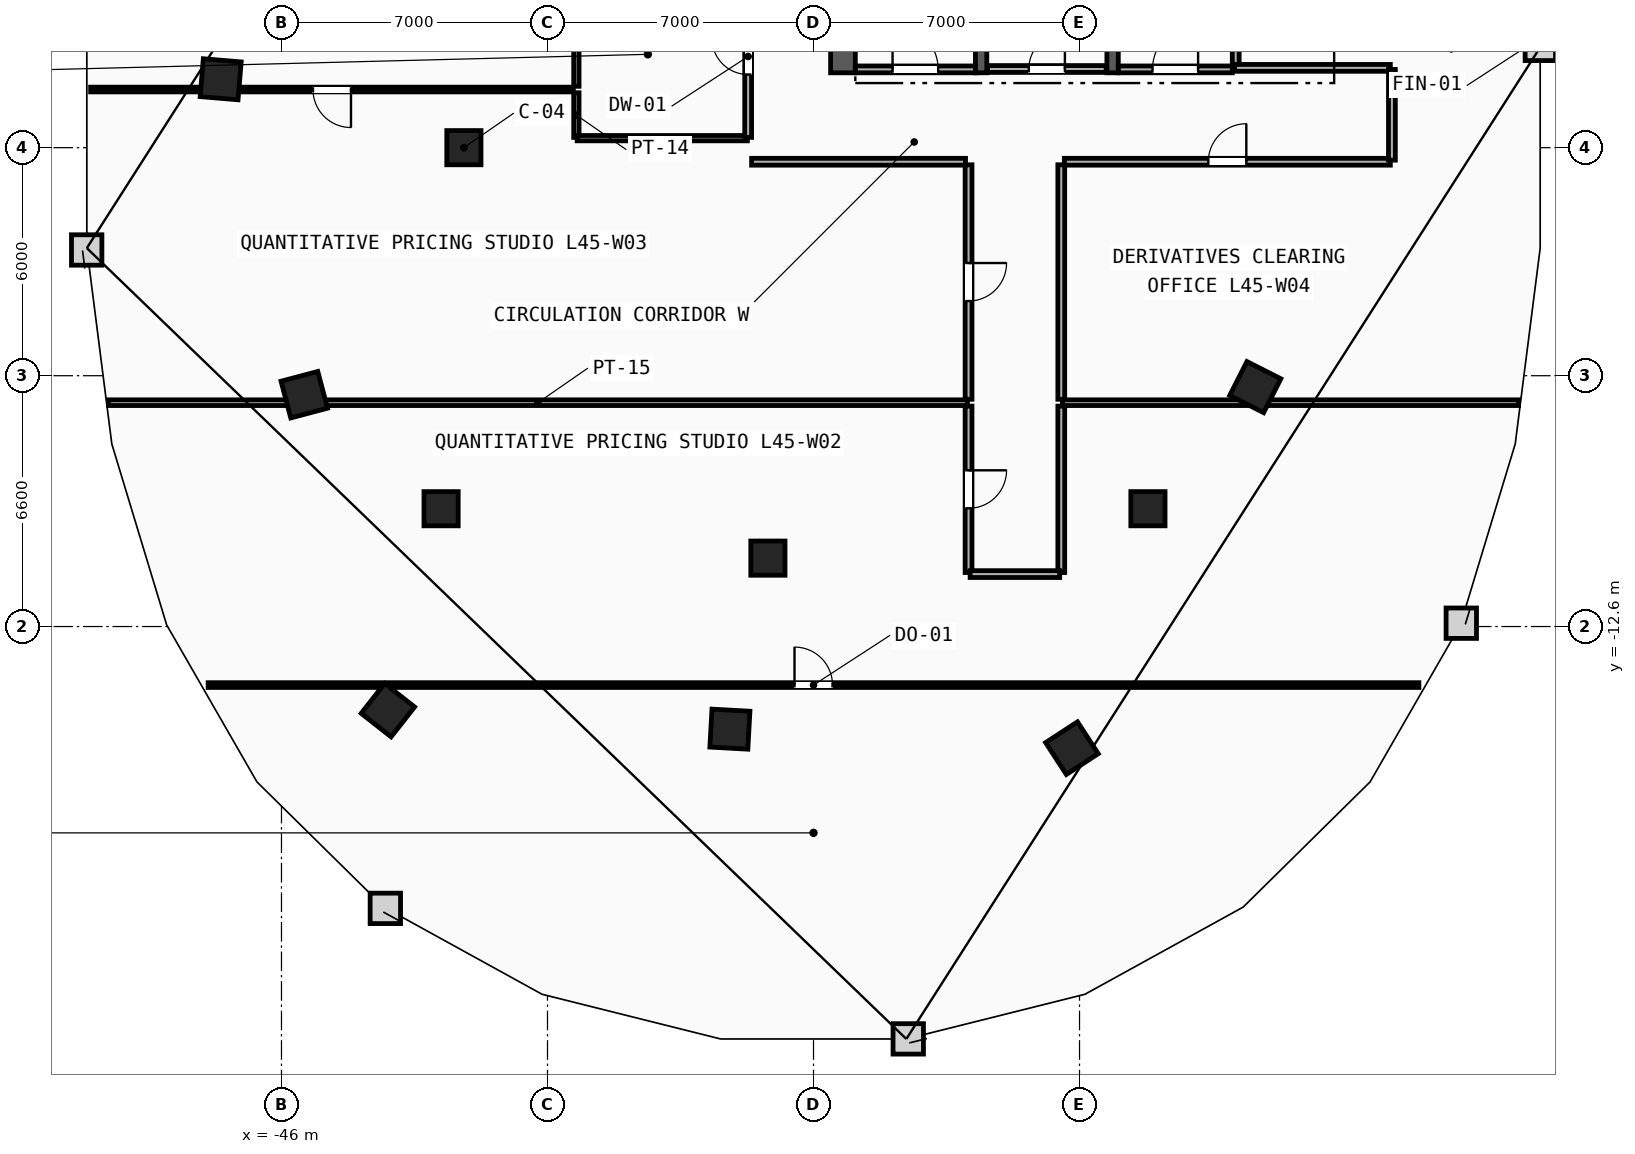
"""IFC4 building model, lengths in metres.
Left out: names, types, materials, properties, quantities, classifications, styles, units other than length and angle.
Written with IfcOpenShell. Run it as: python <this file> out.ifc"""

import sys

from ifc_helpers import new_model, si_unit, direction, frame, frame_2d, origin, origin_2d, place, context, subcontext, project, spatial, rectangle, extrude, element, fill, save


model = new_model("IFC4")
c1 = context("Model", 3, precision=1e-05, world=origin(), true_north=direction((0.0, 1.0)))
c2 = subcontext(c1, "Body", "Model", "MODEL_VIEW")
j1 = project(units=[si_unit("LENGTHUNIT", "METRE"), si_unit("PLANEANGLEUNIT", "RADIAN")], contexts=[c1])
p1 = place(None, origin())
s1 = spatial("IfcSite", under=j1, at=p1, CompositionType="ELEMENT")
p2 = place(p1, origin())
s2 = spatial("IfcBuilding", under=s1, at=p2, CompositionType="ELEMENT")
p3 = place(p2, frame((0.0, 0.0, 172.8)))
s3 = spatial("IfcBuildingStorey", under=s2, at=p3, CompositionType="ELEMENT", Elevation=172.8)
for number, where, z_axis, x_axis in (
    (1, (-41.2, 0.0, 0.0), (0.0, 0.0, 1.0), (1.0, 0.0, 0.0)),
    (2, (-41.8, -9.5, 0.0), (0.0, 0.0, 1.0), (1.0, 0.0, 0.0)),
    (3, (-33.2, -10.8, 0.0), (0.0, 0.0, 1.0), (1.0, 0.0, 0.0)),
    (4, (-23.2, -9.5, 0.0), (0.0, 0.0, 1.0), (1.0, 0.0, 0.0)),
):
    element("IfcColumn", number, at=place(p3, frame(where, z_axis=z_axis, x_axis=x_axis)), inside=s3, PredefinedType="COLUMN", context=c2, shape_type="SweptSolid", body=[
        extrude(rectangle(XDim=0.9, YDim=0.9, at=origin_2d()), origin(), (0.0, 0.0, 1.0), 3.6),
    ])
for number, where, z_axis, x_axis in (
    (5, (-47.6, 1.8, 0.0), (0.0, 0.0, 1.0), (-0.084, -0.997, 0.0)),
    (6, (-45.4, -6.5, 0.0), (0.0, 0.0, 1.0), (0.256, -0.967, 0.0)),
    (7, (-43.2, -14.8, 0.0), (0.0, 0.0, 1.0), (0.786, -0.618, 0.0)),
    (8, (-34.2, -15.3, 0.0), (0.0, 0.0, 1.0), (0.998, -0.055, 0.0)),
    (9, (-25.2, -15.8, 0.0), (0.0, 0.0, 1.0), (0.838, 0.546, 0.0)),
    (10, (-20.375, -6.3, 0.0), (0.0, 0.0, 1.0), (0.453, 0.892, 0.0)),
):
    element("IfcColumn", number, at=place(p3, frame(where, z_axis=z_axis, x_axis=x_axis)), inside=s3, PredefinedType="COLUMN", context=c2, shape_type="SweptSolid", body=[
        extrude(rectangle(XDim=1.0, YDim=1.0, at=origin_2d()), origin(), (0.0, 0.0, 1.0), 3.6),
    ])
p4 = place(p3, frame((-31.225, 1.97, 0.0), z_axis=(0.0, 0.0, 1.0), x_axis=(0.0, 1.0, 0.0)))
e11 = element("IfcWall", 11, at=p4, inside=s3, PredefinedType="SHEAR", context=c2, shape_type="SweptSolid", body=[
    extrude(rectangle(XDim=13.33, YDim=0.65, at=frame_2d((6.665, 0.0))), origin(), (0.0, 0.0, 1.0), 3.36),
])
for number, where, z_axis, x_axis in (
    (12, (-27.59, 1.97, 0.0), (0.0, 0.0, 1.0), (0.0, 1.0, 0.0)),
    (13, (-24.13, 1.97, 0.0), (0.0, 0.0, 1.0), (0.0, 1.0, 0.0)),
):
    element("IfcWall", number, at=place(p3, frame(where, z_axis=z_axis, x_axis=x_axis)), inside=s3, PredefinedType="SHEAR", context=c2, shape_type="SweptSolid", body=[
        extrude(rectangle(XDim=10.68, YDim=0.3, at=frame_2d((5.34, 0.0))), origin(), (0.0, 0.0, 1.0), 3.36),
    ])
p5 = place(p3, frame((-20.89, 2.15, 0.0), z_axis=(0.0, 0.0, 1.0), x_axis=(0.0, 1.0, 0.0)))
e14 = element("IfcWall", 14, at=p5, inside=s3, PredefinedType="PARTITIONING", context=c2, shape_type="SweptSolid", body=[
    extrude(rectangle(XDim=5.3, YDim=0.18, at=frame_2d((2.65, 0.0))), origin(), (0.0, 0.0, 1.0), 3.36),
])
p6 = place(p3, frame((-23.98, 2.06, 0.0), z_axis=(0.0, 0.0, 1.0), x_axis=(1.0, 0.0, 0.0)))
e15 = element("IfcWall", 15, at=p6, inside=s3, PredefinedType="PARTITIONING", context=c2, shape_type="SweptSolid", body=[
    extrude(rectangle(XDim=3.0, YDim=0.18, at=frame_2d((1.5, 0.0))), origin(), (0.0, 0.0, 1.0), 3.36),
])
p7 = place(p6, frame((0.9, 0.0, 0.0)))
e16 = element("IfcOpeningElement", 16, at=p7, cuts=e15, PredefinedType="OPENING", context=c2, shape_type="SweptSolid", body=[
    extrude(rectangle(XDim=1.2, YDim=2.15, at=frame_2d((0.6, 1.075))), frame((0.0, 0.1, 0.0), z_axis=(0.0, -1.0, 0.0), x_axis=(1.0, 0.0, 0.0)), (0.0, 0.0, 1.0), 0.2),
])
p8 = place(p3, frame((-30.9, 2.06, 0.0), z_axis=(0.0, 0.0, 1.0), x_axis=(1.0, 0.0, 0.0)))
e17 = element("IfcWall", 17, at=p8, inside=s3, PredefinedType="PARTITIONING", context=c2, shape_type="SweptSolid", body=[
    extrude(rectangle(XDim=3.16, YDim=0.18, at=frame_2d((1.58, 0.0))), origin(), (0.0, 0.0, 1.0), 3.36),
])
p9 = place(p8, frame((0.98, 0.0, 0.0)))
e18 = element("IfcOpeningElement", 18, at=p9, cuts=e17, PredefinedType="OPENING", context=c2, shape_type="SweptSolid", body=[
    extrude(rectangle(XDim=1.2, YDim=2.15, at=frame_2d((0.6, 1.075))), frame((0.0, 0.1, 0.0), z_axis=(0.0, -1.0, 0.0), x_axis=(1.0, 0.0, 0.0)), (0.0, 0.0, 1.0), 0.2),
])
p10 = place(p3, frame((-27.42, 2.07, 0.0), z_axis=(0.0, 0.0, 1.0), x_axis=(1.0, 0.0, 0.0)))
e19 = element("IfcWall", 19, at=p10, inside=s3, PredefinedType="PARTITIONING", context=c2, shape_type="SweptSolid", body=[
    extrude(rectangle(XDim=3.12, YDim=0.18, at=frame_2d((1.56, 0.0))), origin(), (0.0, 0.0, 1.0), 3.36),
])
p11 = place(p10, frame((1.085, 0.0, 0.0)))
e20 = element("IfcOpeningElement", 20, at=p11, cuts=e19, PredefinedType="OPENING", context=c2, shape_type="SweptSolid", body=[
    extrude(rectangle(XDim=0.95, YDim=2.1, at=frame_2d((0.475, 1.05))), frame((0.0, 0.1, 0.0), z_axis=(0.0, -1.0, 0.0), x_axis=(1.0, 0.0, 0.0)), (0.0, 0.0, 1.0), 0.2),
])
p12 = place(p3, frame((-38.24, 0.27, 0.0), z_axis=(0.0, 0.0, 1.0), x_axis=(0.0, 1.0, 0.0)))
e21 = element("IfcWall", 21, at=p12, inside=s3, PredefinedType="PARTITIONING", context=c2, shape_type="SweptSolid", body=[
    extrude(rectangle(XDim=1.175, YDim=0.14, at=frame_2d((0.587, 0.0))), origin(), (0.0, 0.0, 1.0), 3.36),
])
p13 = place(p3, frame((-38.24, 1.615, 0.0), z_axis=(0.0, 0.0, 1.0), x_axis=(0.0, 1.0, 0.0)))
e22 = element("IfcWall", 22, at=p13, inside=s3, PredefinedType="PARTITIONING", context=c2, shape_type="SweptSolid", body=[
    extrude(rectangle(XDim=2.93, YDim=0.14, at=frame_2d((1.465, 0.0))), origin(), (0.0, 0.0, 1.0), 3.36),
])
p14 = place(p3, frame((-38.22, 0.25, 0.0), z_axis=(0.0, 0.0, 1.0), x_axis=(1.0, 0.0, 0.0)))
e23 = element("IfcWall", 23, at=p14, inside=s3, PredefinedType="PARTITIONING", context=c2, shape_type="SweptSolid", body=[
    extrude(rectangle(XDim=4.48, YDim=0.14, at=frame_2d((2.24, 0.0))), origin(), (0.0, 0.0, 1.0), 3.36),
])
p15 = place(p3, frame((-33.72, 0.27, 0.0), z_axis=(0.0, 0.0, 1.0), x_axis=(0.0, 1.0, 0.0)))
e24 = element("IfcWall", 24, at=p15, inside=s3, PredefinedType="PARTITIONING", context=c2, shape_type="SweptSolid", body=[
    extrude(rectangle(XDim=4.26, YDim=0.18, at=frame_2d((2.13, 0.0))), origin(), (0.0, 0.0, 1.0), 3.36),
])
p16 = place(p15, frame((1.655, 0.0, 0.0)))
e25 = element("IfcOpeningElement", 25, at=p16, cuts=e24, PredefinedType="OPENING", context=c2, shape_type="SweptSolid", body=[
    extrude(rectangle(XDim=0.95, YDim=2.1, at=frame_2d((0.475, 1.05))), frame((0.0, 0.1, 0.0), z_axis=(0.0, -1.0, 0.0), x_axis=(1.0, 0.0, 0.0)), (0.0, 0.0, 1.0), 0.2),
])
p17 = place(p3, frame((-50.553, -6.71, 0.0), z_axis=(0.0, 0.0, 1.0), x_axis=(1.0, 0.0, 0.0)))
e26 = element("IfcWall", 26, at=p17, inside=s3, PredefinedType="PARTITIONING", context=c2, shape_type="SweptSolid", body=[
    extrude(rectangle(XDim=22.603, YDim=0.15, at=frame_2d((11.302, 0.0))), origin(), (0.0, 0.0, 1.0), 3.36),
])
p18 = place(p3, frame((-25.45, -6.71, 0.0), z_axis=(0.0, 0.0, 1.0), x_axis=(1.0, 0.0, 0.0)))
e27 = element("IfcWall", 27, at=p18, inside=s3, PredefinedType="PARTITIONING", context=c2, shape_type="SweptSolid", body=[
    extrude(rectangle(XDim=12.003, YDim=0.15, at=frame_2d((6.001, 0.0))), origin(), (0.0, 0.0, 1.0), 3.36),
])
p19 = place(p3, frame((-27.92, -6.8, 0.0), z_axis=(0.0, 0.0, 1.0), x_axis=(0.0, -1.0, 0.0)))
e28 = element("IfcWall", 28, at=p19, inside=s3, PredefinedType="PARTITIONING", context=c2, shape_type="SweptSolid", body=[
    extrude(rectangle(XDim=4.378, YDim=0.18, at=frame_2d((2.189, 0.0))), origin(), (0.0, 0.0, 1.0), 3.36),
])
p20 = place(p19, frame((1.689, 0.0, 0.0)))
e29 = element("IfcOpeningElement", 29, at=p20, cuts=e28, PredefinedType="OPENING", context=c2, shape_type="SweptSolid", body=[
    extrude(rectangle(XDim=1.0, YDim=2.15, at=frame_2d((0.5, 1.075))), frame((0.0, 0.1, 0.0), z_axis=(0.0, -1.0, 0.0), x_axis=(1.0, 0.0, 0.0)), (0.0, 0.0, 1.0), 0.2),
])
p21 = place(p3, frame((-25.48, -11.178, 0.0), z_axis=(0.0, 0.0, 1.0), x_axis=(0.0, 1.0, 0.0)))
e30 = element("IfcWall", 30, at=p21, inside=s3, PredefinedType="PARTITIONING", context=c2, shape_type="SweptSolid", body=[
    extrude(rectangle(XDim=4.378, YDim=0.18, at=frame_2d((2.189, 0.0))), origin(), (0.0, 0.0, 1.0), 3.36),
])
p22 = place(p3, frame((-27.878, -11.22, 0.0), z_axis=(0.0, 0.0, 1.0), x_axis=(1.0, 0.0, 0.0)))
e31 = element("IfcWall", 31, at=p22, inside=s3, PredefinedType="PARTITIONING", context=c2, shape_type="SweptSolid", body=[
    extrude(rectangle(XDim=2.357, YDim=0.18, at=frame_2d((1.178, 0.0))), origin(), (0.0, 0.0, 1.0), 3.36),
])
p23 = place(p3, frame((-27.92, -0.45, 0.0), z_axis=(0.0, 0.0, 1.0), x_axis=(0.0, -1.0, 0.0)))
e32 = element("IfcWall", 32, at=p23, inside=s3, PredefinedType="PARTITIONING", context=c2, shape_type="SweptSolid", body=[
    extrude(rectangle(XDim=6.17, YDim=0.18, at=frame_2d((3.085, 0.0))), origin(), (0.0, 0.0, 1.0), 3.36),
])
p24 = place(p23, frame((2.585, 0.0, 0.0)))
e33 = element("IfcOpeningElement", 33, at=p24, cuts=e32, PredefinedType="OPENING", context=c2, shape_type="SweptSolid", body=[
    extrude(rectangle(XDim=1.0, YDim=2.15, at=frame_2d((0.5, 1.075))), frame((0.0, 0.1, 0.0), z_axis=(0.0, -1.0, 0.0), x_axis=(1.0, 0.0, 0.0)), (0.0, 0.0, 1.0), 0.2),
])
p25 = place(p3, frame((-33.628, -0.37, 0.0), z_axis=(0.0, 0.0, 1.0), x_axis=(1.0, 0.0, 0.0)))
e34 = element("IfcWall", 34, at=p25, inside=s3, PredefinedType="PARTITIONING", context=c2, shape_type="SweptSolid", body=[
    extrude(rectangle(XDim=5.628, YDim=0.18, at=frame_2d((2.814, 0.0))), origin(), (0.0, 0.0, 1.0), 3.36),
])
p26 = place(p3, frame((-25.4, -0.37, 0.0), z_axis=(0.0, 0.0, 1.0), x_axis=(1.0, 0.0, 0.0)))
e35 = element("IfcWall", 35, at=p26, inside=s3, PredefinedType="PARTITIONING", context=c2, shape_type="SweptSolid", body=[
    extrude(rectangle(XDim=8.578, YDim=0.18, at=frame_2d((4.289, 0.0))), origin(), (0.0, 0.0, 1.0), 3.36),
])
p27 = place(p26, frame((3.789, 0.0, 0.0)))
e36 = element("IfcOpeningElement", 36, at=p27, cuts=e35, PredefinedType="OPENING", context=c2, shape_type="SweptSolid", body=[
    extrude(rectangle(XDim=1.0, YDim=2.15, at=frame_2d((0.5, 1.075))), frame((0.0, 0.1, 0.0), z_axis=(0.0, -1.0, 0.0), x_axis=(1.0, 0.0, 0.0)), (0.0, 0.0, 1.0), 0.2),
])
p28 = place(p3, frame((-25.48, -6.62, 0.0), z_axis=(0.0, 0.0, 1.0), x_axis=(0.0, 1.0, 0.0)))
e37 = element("IfcWall", 37, at=p28, inside=s3, PredefinedType="PARTITIONING", context=c2, shape_type="SweptSolid", body=[
    extrude(rectangle(XDim=6.17, YDim=0.18, at=frame_2d((3.085, 0.0))), origin(), (0.0, 0.0, 1.0), 3.36),
])
p29 = place(p3, frame((-16.822, 2.1, 0.0), z_axis=(0.0, 0.0, 1.0), x_axis=(-1.0, 0.0, 0.0)))
e38 = element("IfcWall", 38, at=p29, inside=s3, PredefinedType="PARTITIONING", context=c2, shape_type="SweptSolid", body=[
    extrude(rectangle(XDim=4.098, YDim=0.18, at=frame_2d((2.049, 0.0))), origin(), (0.0, 0.0, 1.0), 3.36),
])
p30 = place(p3, frame((-16.78, -0.329, 0.0), z_axis=(0.0, 0.0, 1.0), x_axis=(0.0, 1.0, 0.0)))
e39 = element("IfcWall", 39, at=p30, inside=s3, PredefinedType="PARTITIONING", context=c2, shape_type="SweptSolid", body=[
    extrude(rectangle(XDim=2.387, YDim=0.18, at=frame_2d((1.194, 0.0))), origin(), (0.0, 0.0, 1.0), 3.36),
])
p31 = place(p3, frame((-47.93, -14.14, 0.0), z_axis=(0.0, 0.0, 1.0), x_axis=(1.0, 0.0, 0.0)))
e40 = element("IfcWall", 40, at=p31, inside=s3, PredefinedType="PARTITIONING", context=c2, shape_type="SweptSolid", body=[
    extrude(rectangle(XDim=31.86, YDim=0.125, at=frame_2d((15.93, 0.0))), origin(), (0.0, 0.0, 1.0), 3.36),
])
p32 = place(p31, frame((15.43, 0.0, 0.0)))
e41 = element("IfcOpeningElement", 41, at=p32, cuts=e40, PredefinedType="OPENING", context=c2, shape_type="SweptSolid", body=[
    extrude(rectangle(XDim=1.0, YDim=2.15, at=frame_2d((0.5, 1.075))), frame((0.0, 0.073, 0.0), z_axis=(0.0, -1.0, 0.0), x_axis=(1.0, 0.0, 0.0)), (0.0, 0.0, 1.0), 0.145),
])
p33 = place(p3, frame((-38.32, 1.53, 0.0), z_axis=(0.0, 0.0, 1.0), x_axis=(-1.0, 0.0, 0.0)))
e42 = element("IfcWall", 42, at=p33, inside=s3, PredefinedType="PARTITIONING", context=c2, shape_type="SweptSolid", body=[
    extrude(rectangle(XDim=12.702, YDim=0.125, at=frame_2d((6.351, 0.0))), origin(), (0.0, 0.0, 1.0), 3.36),
])
p34 = place(p33, frame((5.851, 0.0, 0.0)))
e43 = element("IfcOpeningElement", 43, at=p34, cuts=e42, PredefinedType="OPENING", context=c2, shape_type="SweptSolid", body=[
    extrude(rectangle(XDim=1.0, YDim=2.15, at=frame_2d((0.5, 1.075))), frame((0.0, 0.073, 0.0), z_axis=(0.0, -1.0, 0.0), x_axis=(1.0, 0.0, 0.0)), (0.0, 0.0, 1.0), 0.145),
])
p35 = place(p7, origin())
e44 = element("IfcDoor", 44, at=p35, inside=s3, OperationType="SINGLE_SWING_RIGHT", PredefinedType="DOOR", context=c2, shape_type="SweptSolid", body=[
    extrude(rectangle(XDim=1.2, YDim=2.15, at=frame_2d((0.6, 1.075))), frame((0.0, 0.025, 0.0), z_axis=(0.0, -1.0, 0.0), x_axis=(1.0, 0.0, 0.0)), (0.0, 0.0, 1.0), 0.05),
])
fill(e16, e44)
p36 = place(p9, origin())
e45 = element("IfcDoor", 45, at=p36, inside=s3, OperationType="SINGLE_SWING_LEFT", PredefinedType="DOOR", context=c2, shape_type="SweptSolid", body=[
    extrude(rectangle(XDim=1.2, YDim=2.15, at=frame_2d((0.6, 1.075))), frame((0.0, 0.025, 0.0), z_axis=(0.0, -1.0, 0.0), x_axis=(1.0, 0.0, 0.0)), (0.0, 0.0, 1.0), 0.05),
])
fill(e18, e45)
p37 = place(p32, origin())
e46 = element("IfcDoor", 46, at=p37, inside=s3, OperationType="SINGLE_SWING_LEFT", PredefinedType="DOOR", context=c2, shape_type="SweptSolid", body=[
    extrude(rectangle(XDim=1.0, YDim=2.15, at=frame_2d((0.5, 1.075))), frame((0.0, 0.025, 0.0), z_axis=(0.0, -1.0, 0.0), x_axis=(1.0, 0.0, 0.0)), (0.0, 0.0, 1.0), 0.05),
])
fill(e41, e46)
p38 = place(p34, origin())
e47 = element("IfcDoor", 47, at=p38, inside=s3, OperationType="SINGLE_SWING_LEFT", PredefinedType="DOOR", context=c2, shape_type="SweptSolid", body=[
    extrude(rectangle(XDim=1.0, YDim=2.15, at=frame_2d((0.5, 1.075))), frame((0.0, 0.025, 0.0), z_axis=(0.0, -1.0, 0.0), x_axis=(1.0, 0.0, 0.0)), (0.0, 0.0, 1.0), 0.05),
])
fill(e43, e47)
p39 = place(p27, origin())
e48 = element("IfcDoor", 48, at=p39, inside=s3, OperationType="SINGLE_SWING_RIGHT", PredefinedType="DOOR", context=c2, shape_type="SweptSolid", body=[
    extrude(rectangle(XDim=1.0, YDim=2.15, at=frame_2d((0.5, 1.075))), frame((0.0, 0.025, 0.0), z_axis=(0.0, -1.0, 0.0), x_axis=(1.0, 0.0, 0.0)), (0.0, 0.0, 1.0), 0.05),
])
fill(e36, e48)
p40 = place(p24, origin())
e49 = element("IfcDoor", 49, at=p40, inside=s3, OperationType="SINGLE_SWING_LEFT", PredefinedType="DOOR", context=c2, shape_type="SweptSolid", body=[
    extrude(rectangle(XDim=1.0, YDim=2.15, at=frame_2d((0.5, 1.075))), frame((0.0, 0.025, 0.0), z_axis=(0.0, -1.0, 0.0), x_axis=(1.0, 0.0, 0.0)), (0.0, 0.0, 1.0), 0.05),
])
fill(e33, e49)
p41 = place(p20, origin())
e50 = element("IfcDoor", 50, at=p41, inside=s3, OperationType="SINGLE_SWING_LEFT", PredefinedType="DOOR", context=c2, shape_type="SweptSolid", body=[
    extrude(rectangle(XDim=1.0, YDim=2.15, at=frame_2d((0.5, 1.075))), frame((0.0, 0.025, 0.0), z_axis=(0.0, -1.0, 0.0), x_axis=(1.0, 0.0, 0.0)), (0.0, 0.0, 1.0), 0.05),
])
fill(e29, e50)
p42 = place(p16, origin())
e51 = element("IfcDoor", 51, at=p42, inside=s3, OperationType="SINGLE_SWING_RIGHT", PredefinedType="DOOR", context=c2, shape_type="SweptSolid", body=[
    extrude(rectangle(XDim=0.95, YDim=2.1, at=frame_2d((0.475, 1.05))), frame((0.0, 0.025, 0.0), z_axis=(0.0, -1.0, 0.0), x_axis=(1.0, 0.0, 0.0)), (0.0, 0.0, 1.0), 0.05),
])
fill(e25, e51)
p43 = place(p11, origin())
e52 = element("IfcDoor", 52, at=p43, inside=s3, OperationType="SINGLE_SWING_RIGHT", PredefinedType="DOOR", context=c2, shape_type="SweptSolid", body=[
    extrude(rectangle(XDim=0.95, YDim=2.1, at=frame_2d((0.475, 1.05))), frame((0.0, 0.025, 0.0), z_axis=(0.0, -1.0, 0.0), x_axis=(1.0, 0.0, 0.0)), (0.0, 0.0, 1.0), 0.05),
])
fill(e20, e52)
save(model, sys.argv[1])
